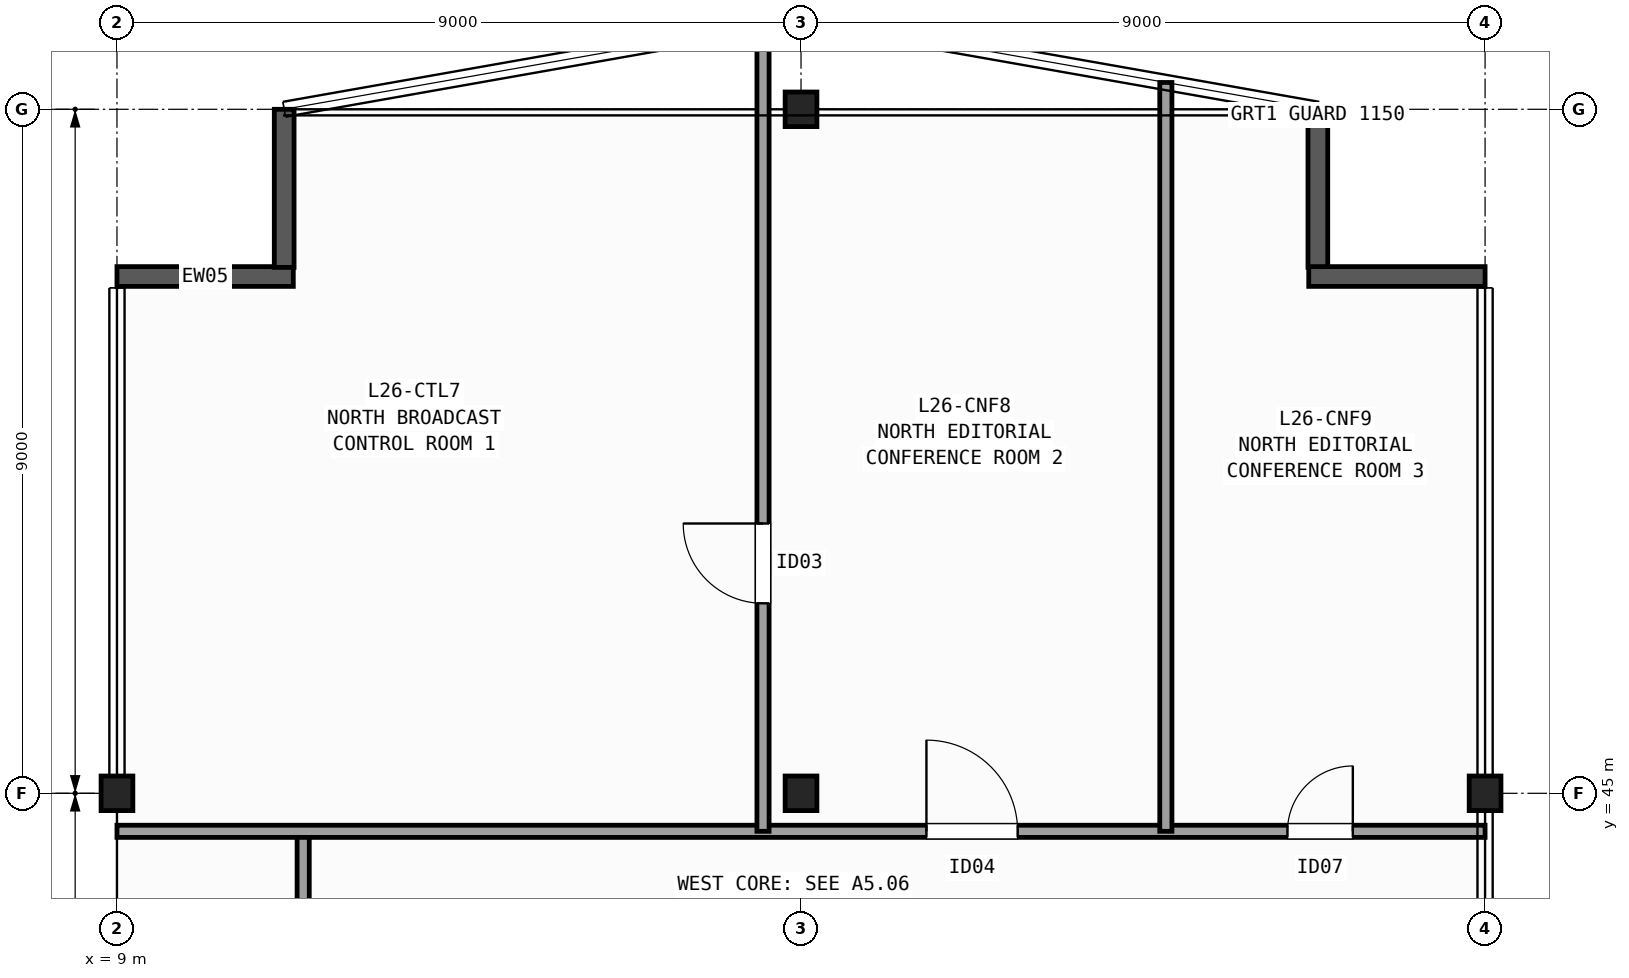
"""IFC4 building model, lengths in metres.
Left out: names, types, materials, properties, quantities, classifications, styles, units other than length and angle.
Written with IfcOpenShell. Run it as: python <this file> out.ifc"""

import sys

from ifc_helpers import new_model, si_unit, direction, frame, frame_2d, origin, origin_2d, place, context, subcontext, project, spatial, rectangle, i_section, extrude, element, fill, save


model = new_model("IFC4")
c1 = context("Model", 3, precision=1e-05, world=origin(), true_north=direction((0.0, 1.0)))
c2 = subcontext(c1, "Body", "Model", "MODEL_VIEW")
j1 = project(units=[si_unit("LENGTHUNIT", "METRE"), si_unit("PLANEANGLEUNIT", "RADIAN")], contexts=[c1])
p1 = place(None, origin())
s1 = spatial("IfcSite", under=j1, at=p1, CompositionType="ELEMENT")
p2 = place(p1, origin())
s2 = spatial("IfcBuilding", under=s1, at=p2, CompositionType="ELEMENT")
p3 = place(p2, frame((0.0, 0.0, 110.0)))
s3 = spatial("IfcBuildingStorey", under=s2, at=p3, CompositionType="ELEMENT", Elevation=110.0)
for number, where, z_axis, x_axis in (
    (1, (9.0, 45.0, 0.0), (0.0, 0.0, 1.0), (1.0, 0.0, 0.0)),
    (2, (18.0, 45.0, 0.0), (0.0, 0.0, 1.0), (1.0, 0.0, 0.0)),
    (3, (18.0, 54.0, 0.0), (0.0, 0.0, 1.0), (1.0, 0.0, 0.0)),
    (4, (27.0, 45.0, 0.0), (0.0, 0.0, 1.0), (1.0, 0.0, 0.0)),
):
    element("IfcColumn", number, at=place(p3, frame(where, z_axis=z_axis, x_axis=x_axis)), inside=s3, PredefinedType="COLUMN", context=c2, shape_type="SweptSolid", body=[
        extrude(i_section(OverallWidth=0.418, OverallDepth=0.455, WebThickness=0.042, FlangeThickness=0.068, FilletRadius=0.015, at=origin_2d()), origin(), (0.0, 0.0, 1.0), 3.7),
    ])
p4 = place(p3, frame((9.0, 51.8, 0.0), z_axis=(0.0, 0.0, 1.0), x_axis=(1.0, 0.0, 0.0)))
e5 = element("IfcWall", 5, at=p4, inside=s3, PredefinedType="SOLIDWALL", context=c2, shape_type="SweptSolid", body=[
    extrude(rectangle(XDim=2.32, YDim=0.26, at=frame_2d((1.16, 0.0))), origin(), (0.0, 0.0, 1.0), 3.42),
])
for number, where, z_axis, x_axis in (
    (6, (11.2, 51.92, 0.0), (0.0, 0.0, 1.0), (0.0, 1.0, 0.0)),
    (7, (24.8, 54.0, 0.0), (0.0, 0.0, 1.0), (0.0, -1.0, 0.0)),
):
    element("IfcWall", number, at=place(p3, frame(where, z_axis=z_axis, x_axis=x_axis)), inside=s3, PredefinedType="SOLIDWALL", context=c2, shape_type="SweptSolid", body=[
        extrude(rectangle(XDim=2.08, YDim=0.26, at=frame_2d((1.04, 0.0))), origin(), (0.0, 0.0, 1.0), 3.42),
    ])
p5 = place(p3, frame((24.68, 51.8, 0.0), z_axis=(0.0, 0.0, 1.0), x_axis=(1.0, 0.0, 0.0)))
e8 = element("IfcWall", 8, at=p5, inside=s3, PredefinedType="SOLIDWALL", context=c2, shape_type="SweptSolid", body=[
    extrude(rectangle(XDim=2.32, YDim=0.26, at=frame_2d((1.16, 0.0))), origin(), (0.0, 0.0, 1.0), 3.42),
])
p6 = place(p3, frame((11.45, 42.4, 0.0), z_axis=(0.0, 0.0, 1.0), x_axis=(0.0, 1.0, 0.0)))
e9 = element("IfcWall", 9, at=p6, inside=s3, PredefinedType="PARTITIONING", context=c2, shape_type="SweptSolid", body=[
    extrude(rectangle(XDim=2.1, YDim=0.16, at=frame_2d((1.05, 0.0))), origin(), (0.0, 0.0, 1.0), 3.42),
])
p7 = place(p3, frame((9.0, 44.5, 0.0), z_axis=(0.0, 0.0, 1.0), x_axis=(1.0, 0.0, 0.0)))
e10 = element("IfcWall", 10, at=p7, inside=s3, PredefinedType="PARTITIONING", context=c2, shape_type="SweptSolid", body=[
    extrude(rectangle(XDim=18.0, YDim=0.16, at=frame_2d((9.0, 0.0))), origin(), (0.0, 0.0, 1.0), 2.634),
])
p8 = place(p7, frame((10.65, 0.0, 0.0)))
e11 = element("IfcOpeningElement", 11, at=p8, cuts=e10, PredefinedType="OPENING", context=c2, shape_type="SweptSolid", body=[
    extrude(rectangle(XDim=1.2, YDim=2.15, at=frame_2d((0.6, 1.075))), frame((0.0, 0.09, 0.0), z_axis=(0.0, -1.0, 0.0), x_axis=(1.0, 0.0, 0.0)), (0.0, 0.0, 1.0), 0.18),
])
p9 = place(p7, frame((15.4, 0.0, 0.0)))
e12 = element("IfcOpeningElement", 12, at=p9, cuts=e10, PredefinedType="OPENING", context=c2, shape_type="SweptSolid", body=[
    extrude(rectangle(XDim=0.86, YDim=2.05, at=frame_2d((0.43, 1.025))), frame((0.0, 0.09, 0.0), z_axis=(0.0, -1.0, 0.0), x_axis=(1.0, 0.0, 0.0)), (0.0, 0.0, 1.0), 0.18),
])
p10 = place(p3, frame((17.5, 44.5, 0.0), z_axis=(0.0, 0.0, 1.0), x_axis=(0.0, 1.0, 0.0)))
e13 = element("IfcWall", 13, at=p10, inside=s3, PredefinedType="PARTITIONING", context=c2, shape_type="SweptSolid", body=[
    extrude(rectangle(XDim=10.612, YDim=0.16, at=frame_2d((5.306, 0.0))), origin(), (0.0, 0.0, 1.0), 3.42),
])
p11 = place(p10, frame((3.0, 0.0, 0.0)))
e14 = element("IfcOpeningElement", 14, at=p11, cuts=e13, PredefinedType="OPENING", context=c2, shape_type="SweptSolid", body=[
    extrude(rectangle(XDim=1.05, YDim=2.15, at=frame_2d((0.525, 1.075))), frame((0.0, 0.09, 0.0), z_axis=(0.0, -1.0, 0.0), x_axis=(1.0, 0.0, 0.0)), (0.0, 0.0, 1.0), 0.18),
])
p12 = place(p3, frame((22.8, 44.5, 0.0), z_axis=(0.0, 0.0, 1.0), x_axis=(0.0, 1.0, 0.0)))
e15 = element("IfcWall", 15, at=p12, inside=s3, PredefinedType="PARTITIONING", context=c2, shape_type="SweptSolid", body=[
    extrude(rectangle(XDim=9.853, YDim=0.16, at=frame_2d((4.927, 0.0))), origin(), (0.0, 0.0, 1.0), 3.42),
])
p13 = place(p11, origin())
e16 = element("IfcDoor", 16, at=p13, inside=s3, OperationType="SINGLE_SWING_RIGHT", PredefinedType="DOOR", context=c2, shape_type="SweptSolid", body=[
    extrude(rectangle(XDim=1.05, YDim=2.15, at=frame_2d((0.525, 1.075))), frame((0.0, 0.025, 0.0), z_axis=(0.0, -1.0, 0.0), x_axis=(1.0, 0.0, 0.0)), (0.0, 0.0, 1.0), 0.05),
])
fill(e14, e16)
p14 = place(p8, origin())
e17 = element("IfcDoor", 17, at=p14, inside=s3, OperationType="SINGLE_SWING_LEFT", PredefinedType="DOOR", context=c2, shape_type="SweptSolid", body=[
    extrude(rectangle(XDim=1.2, YDim=2.15, at=frame_2d((0.6, 1.075))), frame((0.0, 0.025, 0.0), z_axis=(0.0, -1.0, 0.0), x_axis=(1.0, 0.0, 0.0)), (0.0, 0.0, 1.0), 0.05),
])
fill(e11, e17)
p15 = place(p9, origin())
e18 = element("IfcDoor", 18, at=p15, inside=s3, OperationType="SINGLE_SWING_RIGHT", PredefinedType="DOOR", context=c2, shape_type="SweptSolid", body=[
    extrude(rectangle(XDim=0.86, YDim=2.05, at=frame_2d((0.43, 1.025))), frame((0.0, 0.025, 0.0), z_axis=(0.0, -1.0, 0.0), x_axis=(1.0, 0.0, 0.0)), (0.0, 0.0, 1.0), 0.05),
])
fill(e12, e18)
save(model, sys.argv[1])
